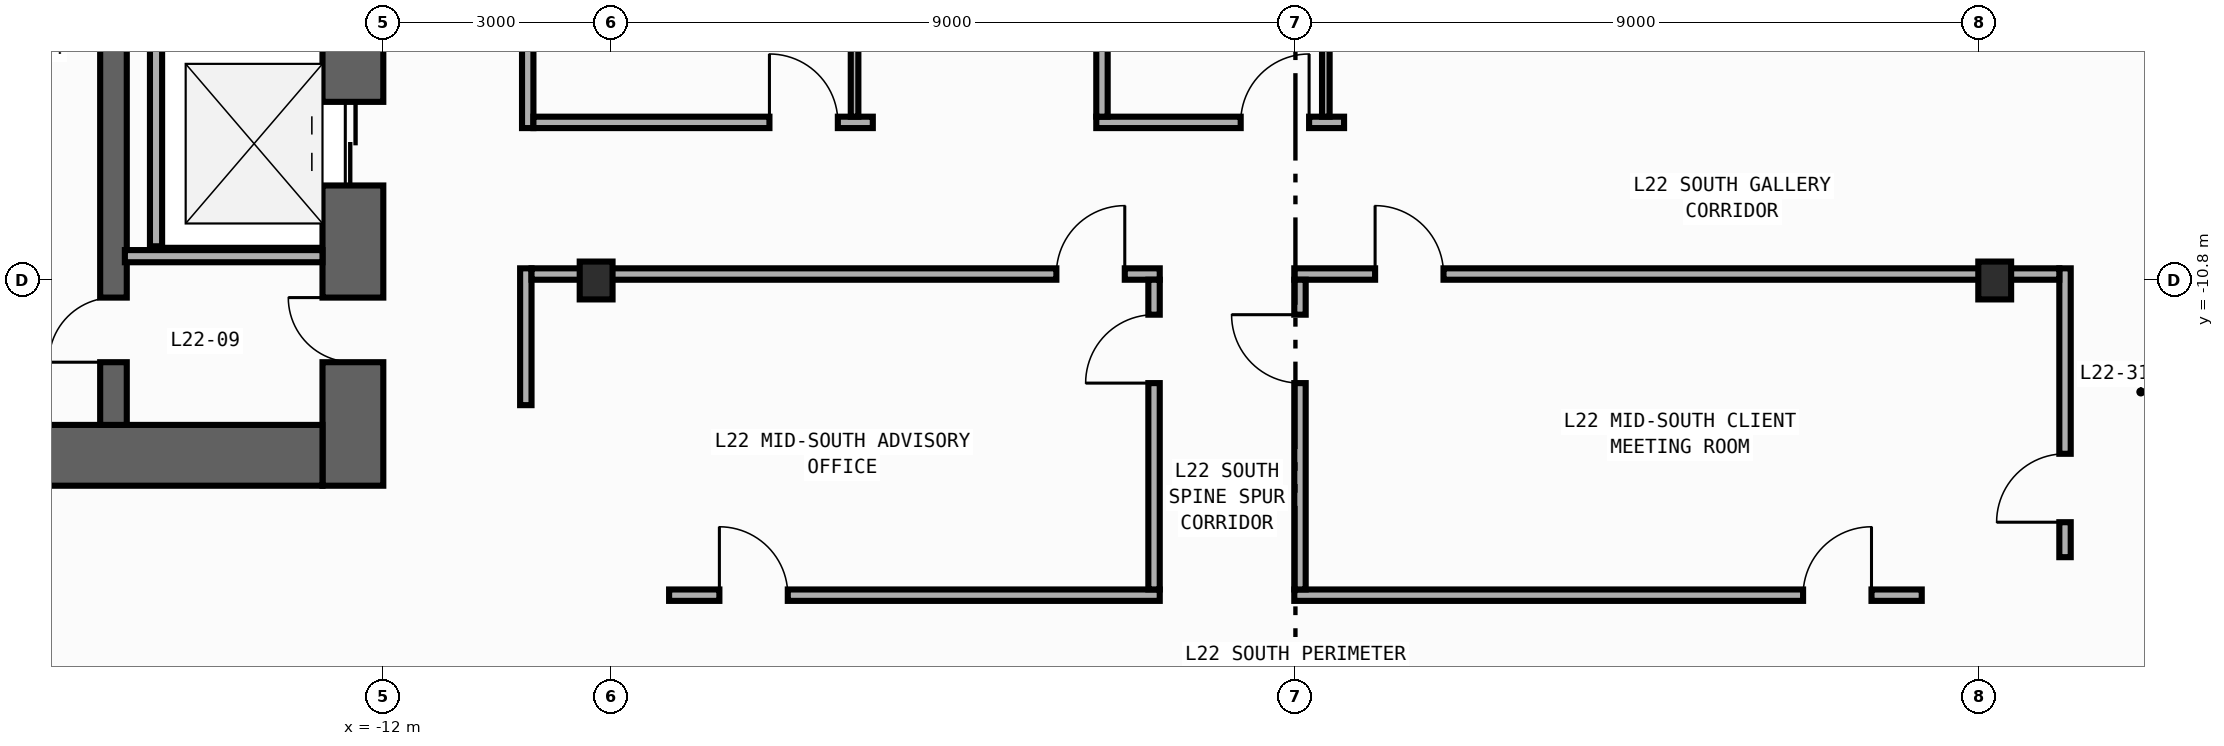
"""IFC4 building model, lengths in metres.
Left out: names, types, materials, properties, quantities, classifications, styles, units other than length and angle.
Written with IfcOpenShell. Run it as: python <this file> out.ifc"""

import sys

from ifc_helpers import new_model, si_unit, direction, frame, frame_2d, origin, origin_2d, place, context, subcontext, project, spatial, rectangle, i_section, extrude, element, fill, save


model = new_model("IFC4")
c1 = context("Model", 3, precision=1e-05, world=origin(), true_north=direction((0.0, 1.0)))
c2 = subcontext(c1, "Body", "Model", "MODEL_VIEW")
j1 = project(units=[si_unit("LENGTHUNIT", "METRE"), si_unit("PLANEANGLEUNIT", "RADIAN")], contexts=[c1])
p1 = place(None, origin())
s1 = spatial("IfcSite", under=j1, at=p1, CompositionType="ELEMENT")
p2 = place(p1, origin())
s2 = spatial("IfcBuilding", under=s1, at=p2, CompositionType="ELEMENT")
p3 = place(p2, frame((0.0, 0.0, 97.4)))
s3 = spatial("IfcBuildingStorey", under=s2, at=p3, CompositionType="ELEMENT", Elevation=97.4)
p4 = place(p3, frame((-12.4, -13.5, 0.0), z_axis=(0.0, 0.0, 1.0), x_axis=(0.0, 1.0, 0.0)))
e1 = element("IfcWall", 1, at=p4, inside=s3, PredefinedType="SHEAR", context=c2, shape_type="SweptSolid", body=[
    extrude(rectangle(XDim=27.0, YDim=0.8, at=frame_2d((13.5, 0.0))), origin(), (0.0, 0.0, 1.0), 3.94),
])
p5 = place(p4, frame((10.35, 0.0, 0.0)))
e2 = element("IfcOpeningElement", 2, at=p5, cuts=e1, PredefinedType="OPENING", context=c2, shape_type="SweptSolid", body=[
    extrude(rectangle(XDim=1.1, YDim=2.2, at=frame_2d((0.55, 1.1))), frame((0.0, 0.41, 0.0), z_axis=(0.0, -1.0, 0.0), x_axis=(1.0, 0.0, 0.0)), (0.0, 0.0, 1.0), 0.82),
])
p6 = place(p4, frame((7.15, 0.0, 0.0)))
e3 = element("IfcOpeningElement", 3, at=p6, cuts=e1, PredefinedType="OPENING", context=c2, shape_type="SweptSolid", body=[
    extrude(rectangle(XDim=1.1, YDim=2.2, at=frame_2d((0.55, 1.1))), frame((0.0, 0.41, 0.0), z_axis=(0.0, -1.0, 0.0), x_axis=(1.0, 0.0, 0.0)), (0.0, 0.0, 1.0), 0.82),
])
p7 = place(p4, frame((3.95, 0.0, 0.0)))
e4 = element("IfcOpeningElement", 4, at=p7, cuts=e1, PredefinedType="OPENING", context=c2, shape_type="SweptSolid", body=[
    extrude(rectangle(XDim=1.1, YDim=2.2, at=frame_2d((0.55, 1.1))), frame((0.0, 0.41, 0.0), z_axis=(0.0, -1.0, 0.0), x_axis=(1.0, 0.0, 0.0)), (0.0, 0.0, 1.0), 0.82),
])
p8 = place(p4, frame((15.175, 0.0, 0.0)))
e5 = element("IfcOpeningElement", 5, at=p8, cuts=e1, PredefinedType="OPENING", context=c2, shape_type="SweptSolid", body=[
    extrude(rectangle(XDim=0.85, YDim=2.1, at=frame_2d((0.425, 1.05))), frame((0.0, 0.41, 0.0), z_axis=(0.0, -1.0, 0.0), x_axis=(1.0, 0.0, 0.0)), (0.0, 0.0, 1.0), 0.82),
])
p9 = place(p4, frame((21.275, 0.0, 0.0)))
e6 = element("IfcOpeningElement", 6, at=p9, cuts=e1, PredefinedType="OPENING", context=c2, shape_type="SweptSolid", body=[
    extrude(rectangle(XDim=0.85, YDim=2.1, at=frame_2d((0.425, 1.05))), frame((0.0, 0.41, 0.0), z_axis=(0.0, -1.0, 0.0), x_axis=(1.0, 0.0, 0.0)), (0.0, 0.0, 1.0), 0.82),
])
p10 = place(p4, frame((12.725, 0.0, 0.0)))
e7 = element("IfcOpeningElement", 7, at=p10, cuts=e1, PredefinedType="OPENING", context=c2, shape_type="SweptSolid", body=[
    extrude(rectangle(XDim=1.15, YDim=2.2, at=frame_2d((0.575, 1.1))), frame((0.0, 0.41, 0.0), z_axis=(0.0, -1.0, 0.0), x_axis=(1.0, 0.0, 0.0)), (0.0, 0.0, 1.0), 0.82),
])
p11 = place(p4, frame((1.625, 0.0, 0.0)))
e8 = element("IfcOpeningElement", 8, at=p11, cuts=e1, PredefinedType="OPENING", context=c2, shape_type="SweptSolid", body=[
    extrude(rectangle(XDim=0.85, YDim=2.1, at=frame_2d((0.425, 1.05))), frame((0.0, 0.41, 0.0), z_axis=(0.0, -1.0, 0.0), x_axis=(1.0, 0.0, 0.0)), (0.0, 0.0, 1.0), 0.82),
])
p12 = place(p3, frame((-19.6, -13.1, 0.0), z_axis=(0.0, 0.0, 1.0), x_axis=(1.0, 0.0, 0.0)))
e9 = element("IfcWall", 9, at=p12, inside=s3, PredefinedType="SHEAR", context=c2, shape_type="SweptSolid", body=[
    extrude(rectangle(XDim=6.8, YDim=0.8, at=frame_2d((3.4, 0.0))), origin(), (0.0, 0.0, 1.0), 3.94),
])
p13 = place(p3, frame((-15.55, -12.7, 0.0), z_axis=(0.0, 0.0, 1.0), x_axis=(0.0, 1.0, 0.0)))
e10 = element("IfcWall", 10, at=p13, inside=s3, PredefinedType="SHEAR", context=c2, shape_type="SweptSolid", body=[
    extrude(rectangle(XDim=25.4, YDim=0.35, at=frame_2d((12.7, 0.0))), origin(), (0.0, 0.0, 1.0), 3.94),
])
p14 = place(p13, frame((11.925, 0.0, 0.0)))
e11 = element("IfcOpeningElement", 11, at=p14, cuts=e10, PredefinedType="OPENING", context=c2, shape_type="SweptSolid", body=[
    extrude(rectangle(XDim=1.15, YDim=2.2, at=frame_2d((0.575, 1.1))), frame((0.0, 0.185, 0.0), z_axis=(0.0, -1.0, 0.0), x_axis=(1.0, 0.0, 0.0)), (0.0, 0.0, 1.0), 0.37),
])
p15 = place(p13, frame((0.825, 0.0, 0.0)))
e12 = element("IfcOpeningElement", 12, at=p15, cuts=e10, PredefinedType="OPENING", context=c2, shape_type="SweptSolid", body=[
    extrude(rectangle(XDim=0.85, YDim=2.1, at=frame_2d((0.425, 1.05))), frame((0.0, 0.185, 0.0), z_axis=(0.0, -1.0, 0.0), x_axis=(1.0, 0.0, 0.0)), (0.0, 0.0, 1.0), 0.37),
])
for number, where, z_axis, x_axis in (
    (13, (-9.2, -10.8, 0.0), (0.0, 0.0, 1.0), (1.0, 0.0, 0.0)),
    (14, (9.2, -10.8, 0.0), (0.0, 0.0, 1.0), (1.0, 0.0, 0.0)),
):
    element("IfcColumn", number, at=place(p3, frame(where, z_axis=z_axis, x_axis=x_axis)), inside=s3, PredefinedType="COLUMN", context=c2, shape_type="SweptSolid", body=[
        extrude(i_section(OverallWidth=0.432, OverallDepth=0.498, WebThickness=0.045, FlangeThickness=0.07, FilletRadius=0.022, at=origin_2d()), origin(), (0.0, 0.0, 1.0), 4.2),
    ])
p16 = place(p3, frame((-14.99, -10.35, 0.0), z_axis=(0.0, 0.0, 1.0), x_axis=(0.0, 1.0, 0.0)))
e15 = element("IfcWall", 15, at=p16, inside=s3, PredefinedType="STANDARD", context=c2, shape_type="SweptSolid", body=[
    extrude(rectangle(XDim=2.7, YDim=0.16, at=frame_2d((1.35, 0.0))), origin(), (0.0, 0.0, 1.0), 3.94),
])
p17 = place(p3, frame((-15.4, -10.48, 0.0), z_axis=(0.0, 0.0, 1.0), x_axis=(1.0, 0.0, 0.0)))
e16 = element("IfcWall", 16, at=p17, inside=s3, PredefinedType="STANDARD", context=c2, shape_type="SweptSolid", body=[
    extrude(rectangle(XDim=2.6, YDim=0.16, at=frame_2d((1.3, 0.0))), origin(), (0.0, 0.0, 1.0), 3.94),
])
p18 = place(p3, frame((-10.1, -8.795, 0.0), z_axis=(0.0, 0.0, 1.0), x_axis=(0.0, 1.0, 0.0)))
e17 = element("IfcWall", 17, at=p18, inside=s3, PredefinedType="PARTITIONING", context=c2, shape_type="SweptSolid", body=[
    extrude(rectangle(XDim=4.275, YDim=0.15, at=frame_2d((2.137, 0.0))), origin(), (0.0, 0.0, 1.0), 3.94),
])
p19 = place(p18, frame((2.915, 0.0, 0.0)))
e18 = element("IfcOpeningElement", 18, at=p19, cuts=e17, PredefinedType="OPENING", context=c2, shape_type="SweptSolid", body=[
    extrude(rectangle(XDim=0.9, YDim=2.15, at=frame_2d((0.45, 1.075))), frame((0.0, 0.085, 0.0), z_axis=(0.0, -1.0, 0.0), x_axis=(1.0, 0.0, 0.0)), (0.0, 0.0, 1.0), 0.17),
])
p20 = place(p3, frame((-10.125, -12.44, 0.0), z_axis=(0.0, 0.0, 1.0), x_axis=(0.0, 1.0, 0.0)))
e19 = element("IfcWall", 19, at=p20, inside=s3, PredefinedType="PARTITIONING", context=c2, shape_type="SweptSolid", body=[
    extrude(rectangle(XDim=1.8, YDim=0.15, at=frame_2d((0.9, 0.0))), origin(), (0.0, 0.0, 1.0), 3.94),
])
p21 = place(p3, frame((10.125, -14.44, 0.0), z_axis=(0.0, 0.0, 1.0), x_axis=(0.0, 1.0, 0.0)))
e20 = element("IfcWall", 20, at=p21, inside=s3, PredefinedType="PARTITIONING", context=c2, shape_type="SweptSolid", body=[
    extrude(rectangle(XDim=3.8, YDim=0.15, at=frame_2d((1.9, 0.0))), origin(), (0.0, 0.0, 1.0), 3.94),
])
p22 = place(p21, frame((0.46, 0.0, 0.0)))
e21 = element("IfcOpeningElement", 21, at=p22, cuts=e20, PredefinedType="OPENING", context=c2, shape_type="SweptSolid", body=[
    extrude(rectangle(XDim=0.9, YDim=2.15, at=frame_2d((0.45, 1.075))), frame((0.0, 0.085, 0.0), z_axis=(0.0, -1.0, 0.0), x_axis=(1.0, 0.0, 0.0)), (0.0, 0.0, 1.0), 0.17),
])
p23 = place(p3, frame((-2.62, -8.72, 0.0), z_axis=(0.0, 0.0, 1.0), x_axis=(1.0, 0.0, 0.0)))
e22 = element("IfcWall", 22, at=p23, inside=s3, PredefinedType="PARTITIONING", context=c2, shape_type="SweptSolid", body=[
    extrude(rectangle(XDim=3.26, YDim=0.15, at=frame_2d((1.63, 0.0))), origin(), (0.0, 0.0, 1.0), 3.94),
])
p24 = place(p23, frame((1.9, 0.0, 0.0)))
e23 = element("IfcOpeningElement", 23, at=p24, cuts=e22, PredefinedType="OPENING", context=c2, shape_type="SweptSolid", body=[
    extrude(rectangle(XDim=0.9, YDim=2.15, at=frame_2d((0.45, 1.075))), frame((0.0, 0.085, 0.0), z_axis=(0.0, -1.0, 0.0), x_axis=(1.0, 0.0, 0.0)), (0.0, 0.0, 1.0), 0.17),
])
p25 = place(p3, frame((-10.025, -8.72, 0.0), z_axis=(0.0, 0.0, 1.0), x_axis=(1.0, 0.0, 0.0)))
e24 = element("IfcWall", 24, at=p25, inside=s3, PredefinedType="PARTITIONING", context=c2, shape_type="SweptSolid", body=[
    extrude(rectangle(XDim=4.465, YDim=0.15, at=frame_2d((2.232, 0.0))), origin(), (0.0, 0.0, 1.0), 3.94),
])
p26 = place(p25, frame((3.105, 0.0, 0.0)))
e25 = element("IfcOpeningElement", 25, at=p26, cuts=e24, PredefinedType="OPENING", context=c2, shape_type="SweptSolid", body=[
    extrude(rectangle(XDim=0.9, YDim=2.15, at=frame_2d((0.45, 1.075))), frame((0.0, 0.085, 0.0), z_axis=(0.0, -1.0, 0.0), x_axis=(1.0, 0.0, 0.0)), (0.0, 0.0, 1.0), 0.17),
])
p27 = place(p3, frame((-10.05, -10.715, 0.0), z_axis=(0.0, 0.0, 1.0), x_axis=(1.0, 0.0, 0.0)))
e26 = element("IfcWall", 26, at=p27, inside=s3, PredefinedType="PARTITIONING", context=c2, shape_type="SweptSolid", body=[
    extrude(rectangle(XDim=8.265, YDim=0.15, at=frame_2d((4.133, 0.0))), origin(), (0.0, 0.0, 1.0), 3.24),
])
p28 = place(p27, frame((6.905, 0.0, 0.0)))
e27 = element("IfcOpeningElement", 27, at=p28, cuts=e26, PredefinedType="OPENING", context=c2, shape_type="SweptSolid", body=[
    extrude(rectangle(XDim=0.9, YDim=2.15, at=frame_2d((0.45, 1.075))), frame((0.0, 0.085, 0.0), z_axis=(0.0, -1.0, 0.0), x_axis=(1.0, 0.0, 0.0)), (0.0, 0.0, 1.0), 0.17),
])
p29 = place(p3, frame((-0.015, -10.715, 0.0), z_axis=(0.0, 0.0, 1.0), x_axis=(1.0, 0.0, 0.0)))
e28 = element("IfcWall", 28, at=p29, inside=s3, PredefinedType="PARTITIONING", context=c2, shape_type="SweptSolid", body=[
    extrude(rectangle(XDim=10.065, YDim=0.15, at=frame_2d((5.032, 0.0))), origin(), (0.0, 0.0, 1.0), 3.24),
])
p30 = place(p29, frame((1.063, 0.0, 0.0)))
e29 = element("IfcOpeningElement", 29, at=p30, cuts=e28, PredefinedType="OPENING", context=c2, shape_type="SweptSolid", body=[
    extrude(rectangle(XDim=0.9, YDim=2.15, at=frame_2d((0.45, 1.075))), frame((0.0, 0.085, 0.0), z_axis=(0.0, -1.0, 0.0), x_axis=(1.0, 0.0, 0.0)), (0.0, 0.0, 1.0), 0.17),
])
p31 = place(p3, frame((-2.545, -8.645, 0.0), z_axis=(0.0, 0.0, 1.0), x_axis=(0.0, 1.0, 0.0)))
e30 = element("IfcWall", 30, at=p31, inside=s3, PredefinedType="PARTITIONING", context=c2, shape_type="SweptSolid", body=[
    extrude(rectangle(XDim=2.825, YDim=0.15, at=frame_2d((1.413, 0.0))), origin(), (0.0, 0.0, 1.0), 3.94),
])
p32 = place(p31, frame((1.465, 0.0, 0.0)))
e31 = element("IfcOpeningElement", 31, at=p32, cuts=e30, PredefinedType="OPENING", context=c2, shape_type="SweptSolid", body=[
    extrude(rectangle(XDim=0.9, YDim=2.15, at=frame_2d((0.45, 1.075))), frame((0.0, 0.085, 0.0), z_axis=(0.0, -1.0, 0.0), x_axis=(1.0, 0.0, 0.0)), (0.0, 0.0, 1.0), 0.17),
])
p33 = place(p3, frame((-8.24, -14.94, 0.0), z_axis=(0.0, 0.0, 1.0), x_axis=(1.0, 0.0, 0.0)))
e32 = element("IfcWall", 32, at=p33, inside=s3, PredefinedType="PARTITIONING", context=c2, shape_type="SweptSolid", body=[
    extrude(rectangle(XDim=6.455, YDim=0.15, at=frame_2d((3.228, 0.0))), origin(), (0.0, 0.0, 1.0), 3.94),
])
p34 = place(p33, frame((0.662, 0.0, 0.0)))
e33 = element("IfcOpeningElement", 33, at=p34, cuts=e32, PredefinedType="OPENING", context=c2, shape_type="SweptSolid", body=[
    extrude(rectangle(XDim=0.9, YDim=2.15, at=frame_2d((0.45, 1.075))), frame((0.0, 0.085, 0.0), z_axis=(0.0, -1.0, 0.0), x_axis=(1.0, 0.0, 0.0)), (0.0, 0.0, 1.0), 0.17),
])
p35 = place(p3, frame((-0.015, -14.94, 0.0), z_axis=(0.0, 0.0, 1.0), x_axis=(1.0, 0.0, 0.0)))
e34 = element("IfcWall", 34, at=p35, inside=s3, PredefinedType="PARTITIONING", context=c2, shape_type="SweptSolid", body=[
    extrude(rectangle(XDim=8.255, YDim=0.15, at=frame_2d((4.127, 0.0))), origin(), (0.0, 0.0, 1.0), 3.94),
])
p36 = place(p35, frame((6.694, 0.0, 0.0)))
e35 = element("IfcOpeningElement", 35, at=p36, cuts=e34, PredefinedType="OPENING", context=c2, shape_type="SweptSolid", body=[
    extrude(rectangle(XDim=0.9, YDim=2.15, at=frame_2d((0.45, 1.075))), frame((0.0, 0.085, 0.0), z_axis=(0.0, -1.0, 0.0), x_axis=(1.0, 0.0, 0.0)), (0.0, 0.0, 1.0), 0.17),
])
p37 = place(p3, frame((-1.86, -14.865, 0.0), z_axis=(0.0, 0.0, 1.0), x_axis=(0.0, 1.0, 0.0)))
e36 = element("IfcWall", 36, at=p37, inside=s3, PredefinedType="PARTITIONING", context=c2, shape_type="SweptSolid", body=[
    extrude(rectangle(XDim=4.075, YDim=0.15, at=frame_2d((2.038, 0.0))), origin(), (0.0, 0.0, 1.0), 3.94),
])
p38 = place(p37, frame((2.715, 0.0, 0.0)))
e37 = element("IfcOpeningElement", 37, at=p38, cuts=e36, PredefinedType="OPENING", context=c2, shape_type="SweptSolid", body=[
    extrude(rectangle(XDim=0.9, YDim=2.15, at=frame_2d((0.45, 1.075))), frame((0.0, 0.085, 0.0), z_axis=(0.0, -1.0, 0.0), x_axis=(1.0, 0.0, 0.0)), (0.0, 0.0, 1.0), 0.17),
])
p39 = place(p3, frame((0.06, -14.865, 0.0), z_axis=(0.0, 0.0, 1.0), x_axis=(0.0, 1.0, 0.0)))
e38 = element("IfcWall", 38, at=p39, inside=s3, PredefinedType="PARTITIONING", context=c2, shape_type="SweptSolid", body=[
    extrude(rectangle(XDim=4.075, YDim=0.15, at=frame_2d((2.038, 0.0))), origin(), (0.0, 0.0, 1.0), 3.94),
])
p40 = place(p39, frame((2.715, 0.0, 0.0)))
e39 = element("IfcOpeningElement", 39, at=p40, cuts=e38, PredefinedType="OPENING", context=c2, shape_type="SweptSolid", body=[
    extrude(rectangle(XDim=0.9, YDim=2.15, at=frame_2d((0.45, 1.075))), frame((0.0, 0.085, 0.0), z_axis=(0.0, -1.0, 0.0), x_axis=(1.0, 0.0, 0.0)), (0.0, 0.0, 1.0), 0.17),
])
p41 = place(p3, frame((0.4, -5.89, 0.0), z_axis=(0.0, 0.0, 1.0), x_axis=(0.0, -1.0, 0.0)))
e40 = element("IfcWall", 40, at=p41, inside=s3, PredefinedType="PARTITIONING", context=c2, shape_type="SweptSolid", body=[
    extrude(rectangle(XDim=2.755, YDim=0.1, at=frame_2d((1.377, 0.0))), origin(), (0.0, 0.0, 1.0), 3.94),
])
p42 = place(p3, frame((-5.8, -4.59, 0.0), z_axis=(0.0, 0.0, 1.0), x_axis=(0.0, -1.0, 0.0)))
e41 = element("IfcWall", 41, at=p42, inside=s3, PredefinedType="PARTITIONING", context=c2, shape_type="SweptSolid", body=[
    extrude(rectangle(XDim=4.055, YDim=0.1, at=frame_2d((2.027, 0.0))), origin(), (0.0, 0.0, 1.0), 3.94),
])
p43 = place(p7, origin())
e42 = element("IfcDoor", 42, at=p43, inside=s3, OperationType="DOUBLE_DOOR_SLIDING", PredefinedType="DOOR", context=c2, shape_type="SweptSolid", body=[
    extrude(rectangle(XDim=1.1, YDim=2.2, at=frame_2d((0.55, 1.1))), frame((0.0, 0.025, 0.0), z_axis=(0.0, -1.0, 0.0), x_axis=(1.0, 0.0, 0.0)), (0.0, 0.0, 1.0), 0.05),
])
fill(e4, e42)
p44 = place(p11, origin())
e43 = element("IfcDoor", 43, at=p44, inside=s3, OperationType="SINGLE_SWING_RIGHT", PredefinedType="DOOR", context=c2, shape_type="SweptSolid", body=[
    extrude(rectangle(XDim=0.85, YDim=2.1, at=frame_2d((0.425, 1.05))), frame((0.0, 0.025, 0.0), z_axis=(0.0, -1.0, 0.0), x_axis=(1.0, 0.0, 0.0)), (0.0, 0.0, 1.0), 0.05),
])
fill(e8, e43)
p45 = place(p15, origin())
e44 = element("IfcDoor", 44, at=p45, inside=s3, OperationType="SINGLE_SWING_LEFT", PredefinedType="DOOR", context=c2, shape_type="SweptSolid", body=[
    extrude(rectangle(XDim=0.85, YDim=2.1, at=frame_2d((0.425, 1.05))), frame((0.0, 0.025, 0.0), z_axis=(0.0, -1.0, 0.0), x_axis=(1.0, 0.0, 0.0)), (0.0, 0.0, 1.0), 0.05),
])
fill(e12, e44)
p46 = place(p22, origin())
e45 = element("IfcDoor", 45, at=p46, inside=s3, OperationType="SINGLE_SWING_LEFT", PredefinedType="DOOR", context=c2, shape_type="SweptSolid", body=[
    extrude(rectangle(XDim=0.9, YDim=2.15, at=frame_2d((0.45, 1.075))), frame((0.0, 0.025, 0.0), z_axis=(0.0, -1.0, 0.0), x_axis=(1.0, 0.0, 0.0)), (0.0, 0.0, 1.0), 0.05),
])
fill(e21, e45)
p47 = place(p24, origin())
e46 = element("IfcDoor", 46, at=p47, inside=s3, OperationType="SINGLE_SWING_RIGHT", PredefinedType="DOOR", context=c2, shape_type="SweptSolid", body=[
    extrude(rectangle(XDim=0.9, YDim=2.15, at=frame_2d((0.45, 1.075))), frame((0.0, 0.025, 0.0), z_axis=(0.0, -1.0, 0.0), x_axis=(1.0, 0.0, 0.0)), (0.0, 0.0, 1.0), 0.05),
])
fill(e23, e46)
p48 = place(p26, origin())
e47 = element("IfcDoor", 47, at=p48, inside=s3, OperationType="SINGLE_SWING_LEFT", PredefinedType="DOOR", context=c2, shape_type="SweptSolid", body=[
    extrude(rectangle(XDim=0.9, YDim=2.15, at=frame_2d((0.45, 1.075))), frame((0.0, 0.025, 0.0), z_axis=(0.0, -1.0, 0.0), x_axis=(1.0, 0.0, 0.0)), (0.0, 0.0, 1.0), 0.05),
])
fill(e25, e47)
p49 = place(p28, origin())
e48 = element("IfcDoor", 48, at=p49, inside=s3, OperationType="SINGLE_SWING_RIGHT", PredefinedType="DOOR", context=c2, shape_type="SweptSolid", body=[
    extrude(rectangle(XDim=0.9, YDim=2.15, at=frame_2d((0.45, 1.075))), frame((0.0, 0.025, 0.0), z_axis=(0.0, -1.0, 0.0), x_axis=(1.0, 0.0, 0.0)), (0.0, 0.0, 1.0), 0.05),
])
fill(e27, e48)
p50 = place(p30, origin())
e49 = element("IfcDoor", 49, at=p50, inside=s3, OperationType="SINGLE_SWING_LEFT", PredefinedType="DOOR", context=c2, shape_type="SweptSolid", body=[
    extrude(rectangle(XDim=0.9, YDim=2.15, at=frame_2d((0.45, 1.075))), frame((0.0, 0.025, 0.0), z_axis=(0.0, -1.0, 0.0), x_axis=(1.0, 0.0, 0.0)), (0.0, 0.0, 1.0), 0.05),
])
fill(e29, e49)
p51 = place(p34, origin())
e50 = element("IfcDoor", 50, at=p51, inside=s3, OperationType="SINGLE_SWING_LEFT", PredefinedType="DOOR", context=c2, shape_type="SweptSolid", body=[
    extrude(rectangle(XDim=0.9, YDim=2.15, at=frame_2d((0.45, 1.075))), frame((0.0, 0.025, 0.0), z_axis=(0.0, -1.0, 0.0), x_axis=(1.0, 0.0, 0.0)), (0.0, 0.0, 1.0), 0.05),
])
fill(e33, e50)
p52 = place(p36, origin())
e51 = element("IfcDoor", 51, at=p52, inside=s3, OperationType="SINGLE_SWING_RIGHT", PredefinedType="DOOR", context=c2, shape_type="SweptSolid", body=[
    extrude(rectangle(XDim=0.9, YDim=2.15, at=frame_2d((0.45, 1.075))), frame((0.0, 0.025, 0.0), z_axis=(0.0, -1.0, 0.0), x_axis=(1.0, 0.0, 0.0)), (0.0, 0.0, 1.0), 0.05),
])
fill(e35, e51)
p53 = place(p38, origin())
e52 = element("IfcDoor", 52, at=p53, inside=s3, OperationType="SINGLE_SWING_LEFT", PredefinedType="DOOR", context=c2, shape_type="SweptSolid", body=[
    extrude(rectangle(XDim=0.9, YDim=2.15, at=frame_2d((0.45, 1.075))), frame((0.0, 0.025, 0.0), z_axis=(0.0, -1.0, 0.0), x_axis=(1.0, 0.0, 0.0)), (0.0, 0.0, 1.0), 0.05),
])
fill(e37, e52)
p54 = place(p40, origin())
e53 = element("IfcDoor", 53, at=p54, inside=s3, OperationType="SINGLE_SWING_RIGHT", PredefinedType="DOOR", context=c2, shape_type="SweptSolid", body=[
    extrude(rectangle(XDim=0.9, YDim=2.15, at=frame_2d((0.45, 1.075))), frame((0.0, 0.025, 0.0), z_axis=(0.0, -1.0, 0.0), x_axis=(1.0, 0.0, 0.0)), (0.0, 0.0, 1.0), 0.05),
])
fill(e39, e53)
save(model, sys.argv[1])
